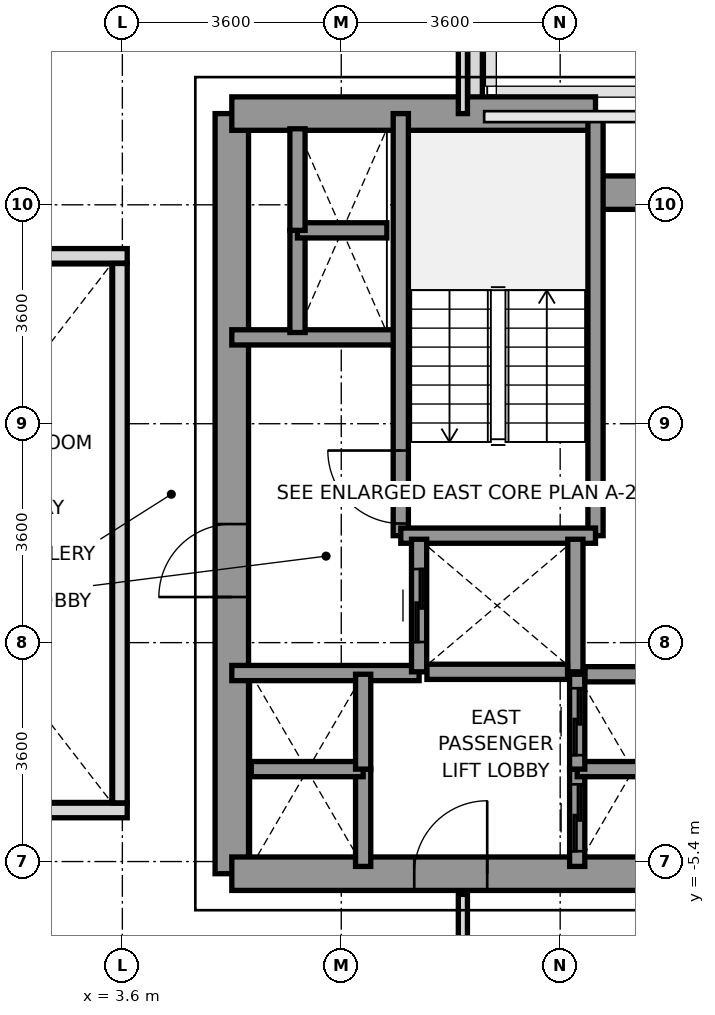
"""IFC4 building model, lengths in metres.
Left out: names, types, materials, properties, quantities, classifications, styles, units other than length and angle.
Written with IfcOpenShell. Run it as: python <this file> out.ifc"""

import sys

from ifc_helpers import new_model, si_unit, direction, frame, frame_2d, origin, place, context, subcontext, project, spatial, rectangle, extrude, source, transform, mapped, element, fill, save


model = new_model("IFC4")
c1 = context("Model", 3, precision=1e-05, world=origin(), true_north=direction((0.0, 1.0)))
c2 = subcontext(c1, "Body", "Model", "MODEL_VIEW")
j1 = project(units=[si_unit("LENGTHUNIT", "METRE"), si_unit("PLANEANGLEUNIT", "RADIAN")], contexts=[c1])
p1 = place(None, origin())
s1 = spatial("IfcSite", under=j1, at=p1, CompositionType="ELEMENT")
p2 = place(p1, origin())
s2 = spatial("IfcBuilding", under=s1, at=p2, CompositionType="ELEMENT")
p3 = place(p2, frame((0.0, 0.0, 47.6)))
s3 = spatial("IfcBuildingStorey", under=s2, at=p3, CompositionType="ELEMENT", Elevation=47.6)
p4 = place(p3, frame((9.4, 8.397, 0.0), z_axis=(0.0, 0.0, 1.0), x_axis=(0.0, -1.0, 0.0)))
e1 = element("IfcWall", 1, at=p4, inside=s3, PredefinedType="PARAPET", context=c2, shape_type="SweptSolid", body=[
    extrude(rectangle(XDim=1.444, YDim=0.24, at=frame_2d((0.722, 0.0))), origin(), (0.0, 0.0, 1.0), 1.15),
])
p5 = place(p3, frame((5.4, -5.6, 0.0), z_axis=(0.0, 0.0, 1.0), x_axis=(0.0, 1.0, 0.0)))
e2 = element("IfcWall", 2, at=p5, inside=s3, PredefinedType="SHEAR", context=c2, shape_type="SweptSolid", body=[
    extrude(rectangle(XDim=12.5, YDim=0.55, at=frame_2d((6.25, 0.0))), origin(), (0.0, 0.0, 1.0), 3.2),
])
p6 = place(p5, frame((4.55, 0.0, 0.0)))
e3 = element("IfcOpeningElement", 3, at=p6, cuts=e2, PredefinedType="OPENING", context=c2, shape_type="SweptSolid", body=[
    extrude(rectangle(XDim=1.2, YDim=2.2, at=frame_2d((0.6, 1.1))), frame((0.0, 0.285, 0.0), z_axis=(0.0, -1.0, 0.0), x_axis=(1.0, 0.0, 0.0)), (0.0, 0.0, 1.0), 0.57),
])
p7 = place(p3, frame((5.4, 6.9, 0.0), z_axis=(0.0, 0.0, 1.0), x_axis=(1.0, 0.0, 0.0)))
e4 = element("IfcWall", 4, at=p7, inside=s3, PredefinedType="SHEAR", context=c2, shape_type="SweptSolid", body=[
    extrude(rectangle(XDim=5.981, YDim=0.55, at=frame_2d((2.991, 0.0))), origin(), (0.0, 0.0, 1.0), 3.2),
])
p8 = place(p3, frame((11.381, 5.6, 0.0), z_axis=(0.0, 0.0, 1.0), x_axis=(1.0, 0.0, 0.0)))
e5 = element("IfcWall", 5, at=p8, inside=s3, PredefinedType="SHEAR", context=c2, shape_type="SweptSolid", body=[
    extrude(rectangle(XDim=1.819, YDim=0.55, at=frame_2d((0.909, 0.0))), origin(), (0.0, 0.0, 1.0), 3.2),
])
p9 = place(p3, frame((5.4, -5.6, 0.0), z_axis=(0.0, 0.0, 1.0), x_axis=(1.0, 0.0, 0.0)))
e6 = element("IfcWall", 6, at=p9, inside=s3, PredefinedType="SHEAR", context=c2, shape_type="SweptSolid", body=[
    extrude(rectangle(XDim=7.8, YDim=0.55, at=frame_2d((3.9, 0.0))), origin(), (0.0, 0.0, 1.0), 3.2),
])
p10 = place(p9, frame((3.0, 0.0, 0.0)))
e7 = element("IfcOpeningElement", 7, at=p10, cuts=e6, PredefinedType="OPENING", context=c2, shape_type="SweptSolid", body=[
    extrude(rectangle(XDim=1.2, YDim=2.2, at=frame_2d((0.6, 1.1))), frame((0.0, 0.285, 0.0), z_axis=(0.0, -1.0, 0.0), x_axis=(1.0, 0.0, 0.0)), (0.0, 0.0, 1.0), 0.57),
])
p11 = place(p3, frame((5.4, 3.22, 0.0), z_axis=(0.0, 0.0, 1.0), x_axis=(1.0, 0.0, 0.0)))
e8 = element("IfcWall", 8, at=p11, inside=s3, PredefinedType="SOLIDWALL", context=c2, shape_type="SweptSolid", body=[
    extrude(rectangle(XDim=2.78, YDim=0.25, at=frame_2d((1.39, 0.0))), origin(), (0.0, 0.0, 1.0), 3.2),
])
p12 = place(p3, frame((5.4, -2.3, 0.0), z_axis=(0.0, 0.0, 1.0), x_axis=(1.0, 0.0, 0.0)))
e9 = element("IfcWall", 9, at=p12, inside=s3, PredefinedType="SOLIDWALL", context=c2, shape_type="SweptSolid", body=[
    extrude(rectangle(XDim=3.08, YDim=0.25, at=frame_2d((1.54, 0.0))), origin(), (0.0, 0.0, 1.0), 3.2),
])
p13 = place(p3, frame((8.179, -0.041, 0.0), z_axis=(0.0, 0.0, 1.0), x_axis=(0.0, 1.0, 0.0)))
e10 = element("IfcWall", 10, at=p13, inside=s3, PredefinedType="SOLIDWALL", context=c2, shape_type="SweptSolid", body=[
    extrude(rectangle(XDim=6.941, YDim=0.25, at=frame_2d((3.47, 0.0))), origin(), (0.0, 0.0, 1.0), 3.2),
])
p14 = place(p13, frame((0.2, 0.0, 0.0)))
e11 = element("IfcOpeningElement", 11, at=p14, cuts=e10, PredefinedType="OPENING", context=c2, shape_type="SweptSolid", body=[
    extrude(rectangle(XDim=1.2, YDim=2.2, at=frame_2d((0.6, 1.1))), frame((0.0, 0.135, 0.0), z_axis=(0.0, -1.0, 0.0), x_axis=(1.0, 0.0, 0.0)), (0.0, 0.0, 1.0), 0.27),
])
p15 = place(p3, frame((11.381, -0.041, 0.0), z_axis=(0.0, 0.0, 1.0), x_axis=(0.0, 1.0, 0.0)))
e12 = element("IfcWall", 12, at=p15, inside=s3, PredefinedType="SOLIDWALL", context=c2, shape_type="SweptSolid", body=[
    extrude(rectangle(XDim=6.941, YDim=0.25, at=frame_2d((3.47, 0.0))), origin(), (0.0, 0.0, 1.0), 3.2),
])
p16 = place(p3, frame((8.179, -0.041, 0.0), z_axis=(0.0, 0.0, 1.0), x_axis=(1.0, 0.0, 0.0)))
e13 = element("IfcWall", 13, at=p16, inside=s3, PredefinedType="SOLIDWALL", context=c2, shape_type="SweptSolid", body=[
    extrude(rectangle(XDim=3.202, YDim=0.25, at=frame_2d((1.601, 0.0))), origin(), (0.0, 0.0, 1.0), 3.2),
])
p17 = place(p3, frame((8.48, -2.28, 0.0), z_axis=(0.0, 0.0, 1.0), x_axis=(0.0, 1.0, 0.0)))
e14 = element("IfcWall", 14, at=p17, inside=s3, PredefinedType="SOLIDWALL", context=c2, shape_type="SweptSolid", body=[
    extrude(rectangle(XDim=2.18, YDim=0.25, at=frame_2d((1.09, 0.0))), origin(), (0.0, 0.0, 1.0), 3.2),
])
p18 = place(p17, frame((0.49, 0.0, 0.0)))
e15 = element("IfcOpeningElement", 15, at=p18, cuts=e14, PredefinedType="OPENING", context=c2, shape_type="SweptSolid", body=[
    extrude(rectangle(XDim=1.2, YDim=2.2, at=frame_2d((0.6, 1.1))), frame((0.0, 0.135, 0.0), z_axis=(0.0, -1.0, 0.0), x_axis=(1.0, 0.0, 0.0)), (0.0, 0.0, 1.0), 0.27),
])
p19 = place(p3, frame((11.05, -2.28, 0.0), z_axis=(0.0, 0.0, 1.0), x_axis=(0.0, 1.0, 0.0)))
e16 = element("IfcWall", 16, at=p19, inside=s3, PredefinedType="SOLIDWALL", context=c2, shape_type="SweptSolid", body=[
    extrude(rectangle(XDim=2.18, YDim=0.25, at=frame_2d((1.09, 0.0))), origin(), (0.0, 0.0, 1.0), 3.2),
])
p20 = place(p3, frame((8.609, -2.28, 0.0), z_axis=(0.0, 0.0, 1.0), x_axis=(1.0, 0.0, 0.0)))
e17 = element("IfcWall", 17, at=p20, inside=s3, PredefinedType="SOLIDWALL", context=c2, shape_type="SweptSolid", body=[
    extrude(rectangle(XDim=2.312, YDim=0.25, at=frame_2d((1.156, 0.0))), origin(), (0.0, 0.0, 1.0), 3.2),
])
p21 = place(p3, frame((11.08, -5.48, 0.0), z_axis=(0.0, 0.0, 1.0), x_axis=(0.0, 1.0, 0.0)))
e18 = element("IfcWall", 18, at=p21, inside=s3, PredefinedType="SOLIDWALL", context=c2, shape_type="SweptSolid", body=[
    extrude(rectangle(XDim=1.6, YDim=0.25, at=frame_2d((0.8, 0.0))), origin(), (0.0, 0.0, 1.0), 3.2),
])
p22 = place(p21, frame((0.25, 0.0, 0.0)))
e19 = element("IfcOpeningElement", 19, at=p22, cuts=e18, PredefinedType="OPENING", context=c2, shape_type="SweptSolid", body=[
    extrude(rectangle(XDim=1.1, YDim=2.2, at=frame_2d((0.55, 1.1))), frame((0.0, 0.135, 0.0), z_axis=(0.0, -1.0, 0.0), x_axis=(1.0, 0.0, 0.0)), (0.0, 0.0, 1.0), 0.27),
])
p23 = place(p3, frame((11.08, -3.88, 0.0), z_axis=(0.0, 0.0, 1.0), x_axis=(1.0, 0.0, 0.0)))
e20 = element("IfcWall", 20, at=p23, inside=s3, PredefinedType="SOLIDWALL", context=c2, shape_type="SweptSolid", body=[
    extrude(rectangle(XDim=1.84, YDim=0.25, at=frame_2d((0.92, 0.0))), origin(), (0.0, 0.0, 1.0), 3.2),
])
p24 = place(p3, frame((11.08, -3.88, 0.0), z_axis=(0.0, 0.0, 1.0), x_axis=(0.0, 1.0, 0.0)))
e21 = element("IfcWall", 21, at=p24, inside=s3, PredefinedType="SOLIDWALL", context=c2, shape_type="SweptSolid", body=[
    extrude(rectangle(XDim=1.56, YDim=0.25, at=frame_2d((0.78, 0.0))), origin(), (0.0, 0.0, 1.0), 3.2),
])
p25 = place(p24, frame((0.23, 0.0, 0.0)))
e22 = element("IfcOpeningElement", 22, at=p25, cuts=e21, PredefinedType="OPENING", context=c2, shape_type="SweptSolid", body=[
    extrude(rectangle(XDim=1.1, YDim=2.2, at=frame_2d((0.55, 1.1))), frame((0.0, 0.135, 0.0), z_axis=(0.0, -1.0, 0.0), x_axis=(1.0, 0.0, 0.0)), (0.0, 0.0, 1.0), 0.27),
])
p26 = place(p3, frame((11.209, -2.32, 0.0), z_axis=(0.0, 0.0, 1.0), x_axis=(1.0, 0.0, 0.0)))
e23 = element("IfcWall", 23, at=p26, inside=s3, PredefinedType="SOLIDWALL", context=c2, shape_type="SweptSolid", body=[
    extrude(rectangle(XDim=1.582, YDim=0.25, at=frame_2d((0.791, 0.0))), origin(), (0.0, 0.0, 1.0), 3.2),
])
p27 = place(p3, frame((7.56, -5.48, 0.0), z_axis=(0.0, 0.0, 1.0), x_axis=(0.0, 1.0, 0.0)))
e24 = element("IfcWall", 24, at=p27, inside=s3, PredefinedType="SOLIDWALL", context=c2, shape_type="SweptSolid", body=[
    extrude(rectangle(XDim=1.6, YDim=0.25, at=frame_2d((0.8, 0.0))), origin(), (0.0, 0.0, 1.0), 3.2),
])
p28 = place(p3, frame((5.72, -3.88, 0.0), z_axis=(0.0, 0.0, 1.0), x_axis=(1.0, 0.0, 0.0)))
e25 = element("IfcWall", 25, at=p28, inside=s3, PredefinedType="SOLIDWALL", context=c2, shape_type="SweptSolid", body=[
    extrude(rectangle(XDim=1.84, YDim=0.25, at=frame_2d((0.92, 0.0))), origin(), (0.0, 0.0, 1.0), 3.2),
])
p29 = place(p3, frame((7.56, -3.88, 0.0), z_axis=(0.0, 0.0, 1.0), x_axis=(0.0, 1.0, 0.0)))
e26 = element("IfcWall", 26, at=p29, inside=s3, PredefinedType="SOLIDWALL", context=c2, shape_type="SweptSolid", body=[
    extrude(rectangle(XDim=1.56, YDim=0.25, at=frame_2d((0.78, 0.0))), origin(), (0.0, 0.0, 1.0), 3.2),
])
p30 = place(p3, frame((6.48, 3.3, 0.0), z_axis=(0.0, 0.0, 1.0), x_axis=(0.0, 1.0, 0.0)))
e27 = element("IfcWall", 27, at=p30, inside=s3, PredefinedType="SOLIDWALL", context=c2, shape_type="SweptSolid", body=[
    extrude(rectangle(XDim=1.68, YDim=0.25, at=frame_2d((0.84, 0.0))), origin(), (0.0, 0.0, 1.0), 3.2),
])
p31 = place(p3, frame((6.48, 4.98, 0.0), z_axis=(0.0, 0.0, 1.0), x_axis=(1.0, 0.0, 0.0)))
e28 = element("IfcWall", 28, at=p31, inside=s3, PredefinedType="SOLIDWALL", context=c2, shape_type="SweptSolid", body=[
    extrude(rectangle(XDim=1.47, YDim=0.25, at=frame_2d((0.735, 0.0))), origin(), (0.0, 0.0, 1.0), 3.2),
])
p32 = place(p3, frame((6.48, 4.98, 0.0), z_axis=(0.0, 0.0, 1.0), x_axis=(0.0, 1.0, 0.0)))
e29 = element("IfcWall", 29, at=p32, inside=s3, PredefinedType="SOLIDWALL", context=c2, shape_type="SweptSolid", body=[
    extrude(rectangle(XDim=1.67, YDim=0.25, at=frame_2d((0.835, 0.0))), origin(), (0.0, 0.0, 1.0), 3.2),
])
p33 = place(p3, frame((9.2, 6.9, 0.0), z_axis=(0.0, 0.0, 1.0), x_axis=(0.0, 1.0, 0.0)))
e30 = element("IfcWall", 30, at=p33, inside=s3, PredefinedType="PARTITIONING", context=c2, shape_type="SweptSolid", body=[
    extrude(rectangle(XDim=8.78, YDim=0.15, at=frame_2d((4.39, 0.0))), origin(), (0.0, 0.0, 1.0), 2.71),
])
p34 = place(p3, frame((9.2, -15.68, 0.0), z_axis=(0.0, 0.0, 1.0), x_axis=(0.0, 1.0, 0.0)))
e31 = element("IfcWall", 31, at=p34, inside=s3, PredefinedType="PARTITIONING", context=c2, shape_type="SweptSolid", body=[
    extrude(rectangle(XDim=9.74, YDim=0.15, at=frame_2d((4.87, 0.0))), origin(), (0.0, 0.0, 1.0), 2.71),
])
for number, where, z_axis, x_axis in (
    (32, (-3.68, -4.56, 0.0), (0.0, 0.0, 1.0), (1.0, 0.0, 0.0)),
    (33, (-3.68, 4.56, 0.0), (0.0, 0.0, 1.0), (1.0, 0.0, 0.0)),
):
    element("IfcWall", number, at=place(p3, frame(where, z_axis=z_axis, x_axis=x_axis)), inside=s3, PredefinedType="PARAPET", context=c2, shape_type="SweptSolid", body=[
        extrude(rectangle(XDim=7.36, YDim=0.24, at=frame_2d((3.68, 0.0))), origin(), (0.0, 0.0, 1.0), 1.15),
    ])
p35 = place(p3, frame((3.56, -4.435, 0.0), z_axis=(0.0, 0.0, 1.0), x_axis=(0.0, 1.0, 0.0)))
e34 = element("IfcWall", 34, at=p35, inside=s3, PredefinedType="PARAPET", context=c2, shape_type="SweptSolid", body=[
    extrude(rectangle(XDim=8.87, YDim=0.24, at=frame_2d((4.435, 0.0))), origin(), (0.0, 0.0, 1.0), 1.15),
])
m1 = source(origin(), c2, "Body", "SweptSolid", [
    extrude(rectangle(XDim=1.2, YDim=2.2, at=frame_2d((0.6, 1.1))), frame((0.0, 0.025, 0.0), z_axis=(0.0, -1.0, 0.0), x_axis=(1.0, 0.0, 0.0)), (0.0, 0.0, 1.0), 0.05),
])
p36 = place(p14, origin())
e35 = element("IfcDoor", 35, at=p36, inside=s3, OperationType="SINGLE_SWING_RIGHT", PredefinedType="DOOR", context=c2, shape_type="MappedRepresentation", body=[
    mapped(m1, transform((0.0, 0.0, 0.0), x_axis=(1.0, 0.0, 0.0), y_axis=(0.0, 1.0, 0.0), z_axis=(0.0, 0.0, 1.0), scale=1.0)),
])
fill(e11, e35)
p37 = place(p6, origin())
e36 = element("IfcDoor", 36, at=p37, inside=s3, OperationType="SINGLE_SWING_LEFT", PredefinedType="DOOR", context=c2, shape_type="MappedRepresentation", body=[
    mapped(m1, transform((0.0, 0.0, 0.0), x_axis=(1.0, 0.0, 0.0), y_axis=(0.0, 1.0, 0.0), z_axis=(0.0, 0.0, 1.0), scale=1.0)),
])
fill(e3, e36)
p38 = place(p10, origin())
e37 = element("IfcDoor", 37, at=p38, inside=s3, OperationType="SINGLE_SWING_RIGHT", PredefinedType="DOOR", context=c2, shape_type="MappedRepresentation", body=[
    mapped(m1, transform((0.0, 0.0, 0.0), x_axis=(1.0, 0.0, 0.0), y_axis=(0.0, 1.0, 0.0), z_axis=(0.0, 0.0, 1.0), scale=1.0)),
])
fill(e7, e37)
p39 = place(p18, origin())
e38 = element("IfcDoor", 38, at=p39, inside=s3, OperationType="SLIDING_TO_RIGHT", PredefinedType="DOOR", context=c2, shape_type="MappedRepresentation", body=[
    mapped(m1, transform((0.0, 0.0, 0.0), x_axis=(1.0, 0.0, 0.0), y_axis=(0.0, 1.0, 0.0), z_axis=(0.0, 0.0, 1.0), scale=1.0)),
])
fill(e15, e38)
m2 = source(origin(), c2, "Body", "SweptSolid", [
    extrude(rectangle(XDim=1.1, YDim=2.2, at=frame_2d((0.55, 1.1))), frame((0.0, 0.025, 0.0), z_axis=(0.0, -1.0, 0.0), x_axis=(1.0, 0.0, 0.0)), (0.0, 0.0, 1.0), 0.05),
])
p40 = place(p22, origin())
e39 = element("IfcDoor", 39, at=p40, inside=s3, OperationType="SLIDING_TO_LEFT", PredefinedType="DOOR", context=c2, shape_type="MappedRepresentation", body=[
    mapped(m2, transform((0.0, 0.0, 0.0), x_axis=(1.0, 0.0, 0.0), y_axis=(0.0, 1.0, 0.0), z_axis=(0.0, 0.0, 1.0), scale=1.0)),
])
fill(e19, e39)
p41 = place(p25, origin())
e40 = element("IfcDoor", 40, at=p41, inside=s3, OperationType="SLIDING_TO_LEFT", PredefinedType="DOOR", context=c2, shape_type="MappedRepresentation", body=[
    mapped(m2, transform((0.0, 0.0, 0.0), x_axis=(1.0, 0.0, 0.0), y_axis=(0.0, 1.0, 0.0), z_axis=(0.0, 0.0, 1.0), scale=1.0)),
])
fill(e22, e40)
save(model, sys.argv[1])
